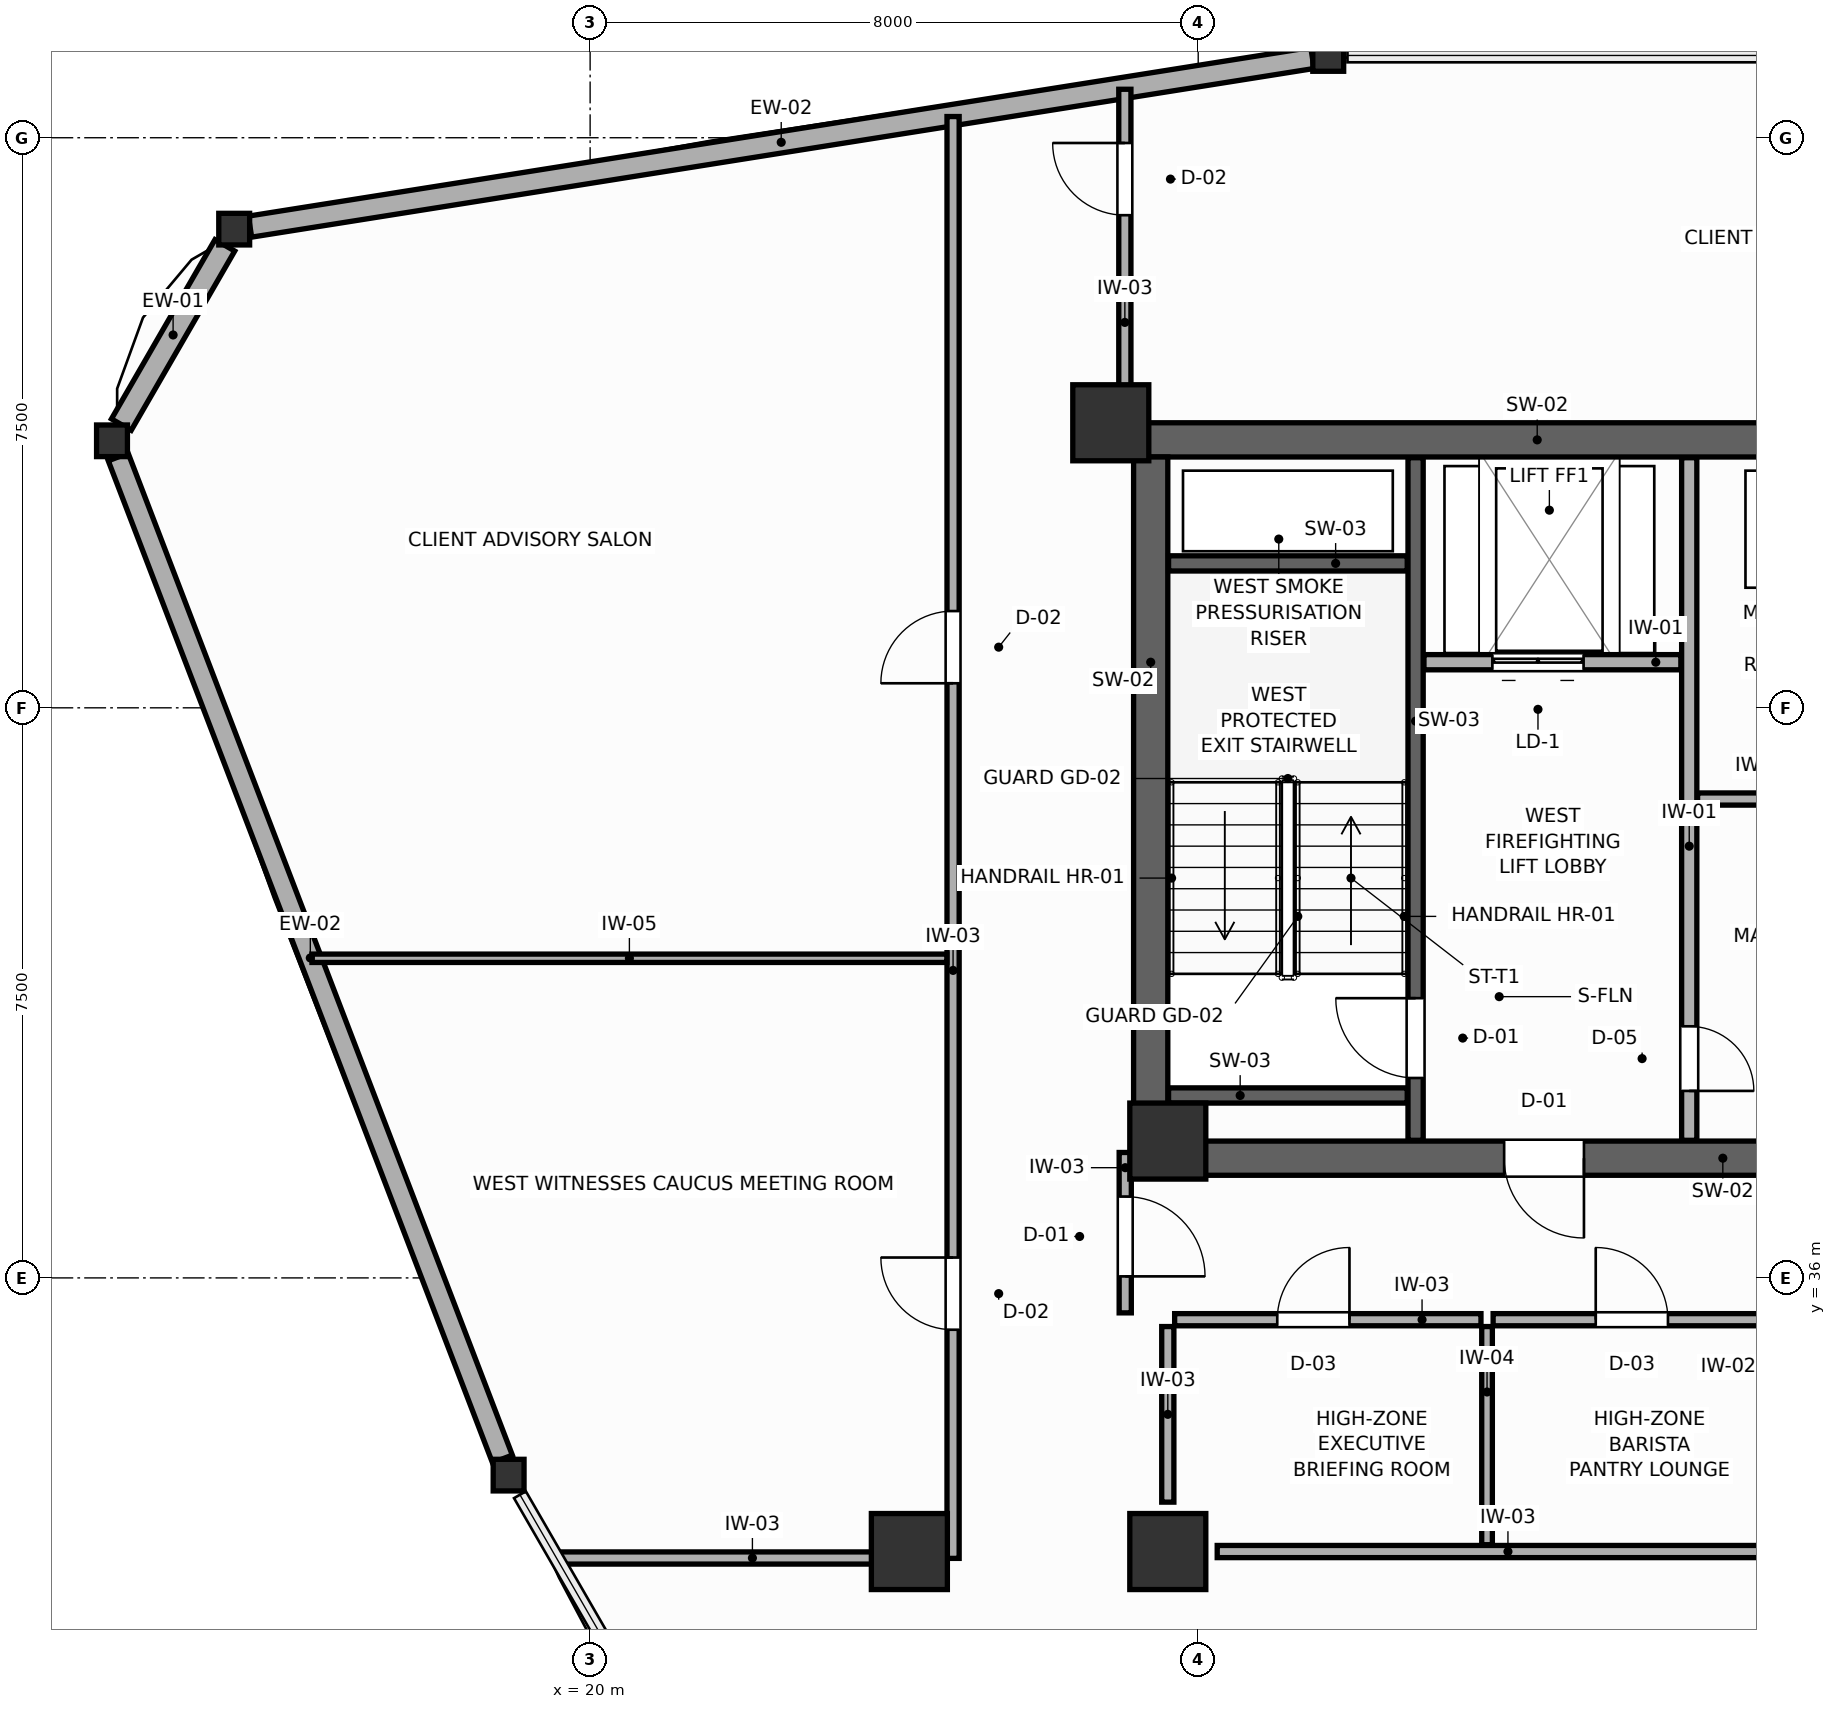
"""IFC4 building model, lengths in metres.
Left out: names, types, materials, properties, quantities, classifications, styles, units other than length and angle.
Written with IfcOpenShell. Run it as: python <this file> out.ifc"""

import sys

from ifc_helpers import new_model, si_unit, direction, frame, frame_2d, origin, origin_2d, place, context, subcontext, project, spatial, rectangle, i_section, extrude, source, transform, mapped, element, fill, save


model = new_model("IFC4")
c1 = context("Model", 3, precision=1e-05, world=origin(), true_north=direction((0.0, 1.0)))
c2 = subcontext(c1, "Body", "Model", "MODEL_VIEW")
j1 = project(units=[si_unit("LENGTHUNIT", "METRE"), si_unit("PLANEANGLEUNIT", "RADIAN")], contexts=[c1])
p1 = place(None, origin())
s1 = spatial("IfcSite", under=j1, at=p1, CompositionType="ELEMENT")
p2 = place(p1, origin())
s2 = spatial("IfcBuilding", under=s1, at=p2, CompositionType="ELEMENT")
p3 = place(p2, frame((0.0, 0.0, 186.6)))
s3 = spatial("IfcBuildingStorey", under=s2, at=p3, CompositionType="ELEMENT", Elevation=186.6)
p4 = place(p3, frame((27.15, 47.025, 0.0), z_axis=(0.0, 0.0, 1.0), x_axis=(1.0, 0.0, 0.0)))
e1 = element("IfcWall", 1, at=p4, inside=s3, PredefinedType="SHEAR", context=c2, shape_type="SweptSolid", body=[
    extrude(rectangle(XDim=17.7, YDim=0.45, at=frame_2d((8.85, 0.0))), origin(), (0.0, 0.0, 1.0), 3.6),
])
p5 = place(p3, frame((27.15, 37.575, 0.0), z_axis=(0.0, 0.0, 1.0), x_axis=(1.0, 0.0, 0.0)))
e2 = element("IfcWall", 2, at=p5, inside=s3, PredefinedType="SHEAR", context=c2, shape_type="SweptSolid", body=[
    extrude(rectangle(XDim=17.7, YDim=0.45, at=frame_2d((8.85, 0.0))), origin(), (0.0, 0.0, 1.0), 3.6),
])
p6 = place(p5, frame((4.875, 0.0, 0.0)))
e3 = element("IfcOpeningElement", 3, at=p6, cuts=e2, PredefinedType="OPENING", context=c2, shape_type="SweptSolid", body=[
    extrude(rectangle(XDim=1.05, YDim=2.1, at=frame_2d((0.525, 1.05))), frame((0.0, 0.235, 0.0), z_axis=(0.0, -1.0, 0.0), x_axis=(1.0, 0.0, 0.0)), (0.0, 0.0, 1.0), 0.47),
])
p7 = place(p5, frame((11.775, 0.0, 0.0)))
e4 = element("IfcOpeningElement", 4, at=p7, cuts=e2, PredefinedType="OPENING", context=c2, shape_type="SweptSolid", body=[
    extrude(rectangle(XDim=1.05, YDim=2.1, at=frame_2d((0.525, 1.05))), frame((0.0, 0.235, 0.0), z_axis=(0.0, -1.0, 0.0), x_axis=(1.0, 0.0, 0.0)), (0.0, 0.0, 1.0), 0.47),
])
p8 = place(p3, frame((27.375, 37.8, 0.0), z_axis=(0.0, 0.0, 1.0), x_axis=(0.0, 1.0, 0.0)))
e5 = element("IfcWall", 5, at=p8, inside=s3, PredefinedType="SHEAR", context=c2, shape_type="SweptSolid", body=[
    extrude(rectangle(XDim=9.0, YDim=0.45, at=frame_2d((4.5, 0.0))), origin(), (0.0, 0.0, 1.0), 3.6),
])
m1 = source(origin(), c2, "Body", "SweptSolid", [
    extrude(rectangle(XDim=1.0, YDim=1.0, at=origin_2d()), origin(), (0.0, 0.0, 1.0), 3.6),
])
for number, where, z_axis, x_axis in (
    (6, (26.85, 47.25, 0.0), (0.0, 0.0, 1.0), (1.0, 0.0, 0.0)),
    (7, (27.6, 37.8, 0.0), (0.0, 0.0, 1.0), (1.0, 0.0, 0.0)),
    (8, (27.6, 32.4, 0.0), (0.0, 0.0, 1.0), (1.0, 0.0, 0.0)),
    (9, (24.2, 32.4, 0.0), (0.0, 0.0, 1.0), (1.0, 0.0, 0.0)),
):
    element("IfcColumn", number, at=place(p3, frame(where, z_axis=z_axis, x_axis=x_axis)), inside=s3, PredefinedType="COLUMN", context=c2, shape_type="MappedRepresentation", body=[
        mapped(m1, transform((0.0, 0.0, 0.0), scale=1.0)),
    ])
m2 = source(origin(), c2, "Body", "SweptSolid", [
    extrude(i_section(OverallWidth=0.406, OverallDepth=0.416, WebThickness=0.027, FlangeThickness=0.044, FilletRadius=0.015, at=origin_2d()), origin(), (0.0, 0.0, 1.0), 3.6),
])
for number, where, z_axis, x_axis in (
    (10, (29.711, 52.082, 0.0), (0.0, 0.0, 1.0), (1.0, 0.0, 0.0)),
    (11, (15.317, 49.798, 0.0), (0.0, 0.0, 1.0), (1.0, 0.0, 0.0)),
    (12, (13.71, 47.013, 0.0), (0.0, 0.0, 1.0), (1.0, 0.0, 0.0)),
    (13, (18.927, 33.406, 0.0), (0.0, 0.0, 1.0), (1.0, 0.0, 0.0)),
):
    element("IfcColumn", number, at=place(p3, frame(where, z_axis=z_axis, x_axis=x_axis)), inside=s3, PredefinedType="COLUMN", context=c2, shape_type="MappedRepresentation", body=[
        mapped(m2, transform((0.0, 0.0, 0.0), scale=1.0)),
    ])
p9 = place(p3, frame((29.503, 52.049, 0.0), z_axis=(0.0, 0.0, 1.0), x_axis=(-0.987634086957, -0.156776625426, 0.0)))
e14 = element("IfcWall", 14, at=p9, inside=s3, PredefinedType="SOLIDWALL", context=c2, shape_type="SweptSolid", body=[
    extrude(rectangle(XDim=14.152, YDim=0.28, at=frame_2d((7.076, 0.0))), origin(), (0.0, 0.0, 1.0), 1.87),
])
p10 = place(p3, frame((15.194, 49.584, 0.0), z_axis=(0.0, 0.0, 1.0), x_axis=(-0.499947493121, -0.866055716523, 0.0)))
e15 = element("IfcWall", 15, at=p10, inside=s3, PredefinedType="SOLIDWALL", context=c2, shape_type="SweptSolid", body=[
    extrude(rectangle(XDim=2.723, YDim=0.3, at=frame_2d((1.362, 0.0))), origin(), (0.0, 0.0, 1.0), 1.87),
])
p11 = place(p3, frame((13.792, 46.8, 0.0), z_axis=(0.0, 0.0, 1.0), x_axis=(0.358033263681, -0.933708831541, 0.0)))
e16 = element("IfcWall", 16, at=p11, inside=s3, PredefinedType="SOLIDWALL", context=c2, shape_type="SweptSolid", body=[
    extrude(rectangle(XDim=14.117, YDim=0.28, at=frame_2d((7.059, 0.0))), origin(), (0.0, 0.0, 1.0), 1.87),
])
p12 = place(p3, frame((30.86, 37.81, 0.0), z_axis=(0.0, 0.0, 1.0), x_axis=(0.0, 1.0, 0.0)))
e17 = element("IfcWall", 17, at=p12, inside=s3, PredefinedType="SHEAR", context=c2, shape_type="SweptSolid", body=[
    extrude(rectangle(XDim=8.98, YDim=0.2, at=frame_2d((4.49, 0.0))), origin(), (0.0, 0.0, 1.0), 3.6),
])
p13 = place(p12, frame((0.82, 0.0, 0.0)))
e18 = element("IfcOpeningElement", 18, at=p13, cuts=e17, PredefinedType="OPENING", context=c2, shape_type="SweptSolid", body=[
    extrude(rectangle(XDim=1.05, YDim=2.1, at=frame_2d((0.525, 1.05))), frame((0.0, 0.11, 0.0), z_axis=(0.0, -1.0, 0.0), x_axis=(1.0, 0.0, 0.0)), (0.0, 0.0, 1.0), 0.22),
])
for number, where, z_axis, x_axis in (
    (19, (27.61, 45.4, 0.0), (0.0, 0.0, 1.0), (1.0, 0.0, 0.0)),
    (20, (27.61, 38.4, 0.0), (0.0, 0.0, 1.0), (1.0, 0.0, 0.0)),
):
    element("IfcWall", number, at=place(p3, frame(where, z_axis=z_axis, x_axis=x_axis)), inside=s3, PredefinedType="SHEAR", context=c2, shape_type="SweptSolid", body=[
        extrude(rectangle(XDim=3.14, YDim=0.2, at=frame_2d((1.57, 0.0))), origin(), (0.0, 0.0, 1.0), 3.6),
    ])
p14 = place(p3, frame((30.97, 44.1, 0.0), z_axis=(0.0, 0.0, 1.0), x_axis=(1.0, 0.0, 0.0)))
e21 = element("IfcWall", 21, at=p14, inside=s3, PredefinedType="PARTITIONING", context=c2, shape_type="SweptSolid", body=[
    extrude(rectangle(XDim=3.38, YDim=0.2, at=frame_2d((1.69, 0.0))), origin(), (0.0, 0.0, 1.0), 3.4),
])
p15 = place(p14, frame((0.9, 0.0, 0.0)))
e22 = element("IfcOpeningElement", 22, at=p15, cuts=e21, PredefinedType="OPENING", context=c2, shape_type="SweptSolid", body=[
    extrude(rectangle(XDim=1.2, YDim=2.1, at=frame_2d((0.6, 1.05))), frame((0.0, 0.11, 0.0), z_axis=(0.0, -1.0, 0.0), x_axis=(1.0, 0.0, 0.0)), (0.0, 0.0, 1.0), 0.22),
])
p16 = place(p3, frame((34.46, 37.81, 0.0), z_axis=(0.0, 0.0, 1.0), x_axis=(0.0, 1.0, 0.0)))
e23 = element("IfcWall", 23, at=p16, inside=s3, PredefinedType="PARTITIONING", context=c2, shape_type="SweptSolid", body=[
    extrude(rectangle(XDim=8.98, YDim=0.2, at=frame_2d((4.49, 0.0))), origin(), (0.0, 0.0, 1.0), 3.4),
])
p17 = place(p16, frame((0.65, 0.0, 0.0)))
e24 = element("IfcOpeningElement", 24, at=p17, cuts=e23, PredefinedType="OPENING", context=c2, shape_type="SweptSolid", body=[
    extrude(rectangle(XDim=0.85, YDim=2.05, at=frame_2d((0.425, 1.025))), frame((0.0, 0.11, 0.0), z_axis=(0.0, -1.0, 0.0), x_axis=(1.0, 0.0, 0.0)), (0.0, 0.0, 1.0), 0.22),
])
p18 = place(p3, frame((34.57, 42.3, 0.0), z_axis=(0.0, 0.0, 1.0), x_axis=(1.0, 0.0, 0.0)))
e25 = element("IfcWall", 25, at=p18, inside=s3, PredefinedType="PARTITIONING", context=c2, shape_type="SweptSolid", body=[
    extrude(rectangle(XDim=2.86, YDim=0.16, at=frame_2d((1.43, 0.0))), origin(), (0.0, 0.0, 1.0), 3.4),
])
p19 = place(p3, frame((28.25, 32.4, 0.0), z_axis=(0.0, 0.0, 1.0), x_axis=(1.0, 0.0, 0.0)))
e26 = element("IfcWall", 26, at=p19, inside=s3, PredefinedType="PARTITIONING", context=c2, shape_type="SweptSolid", body=[
    extrude(rectangle(XDim=7.65, YDim=0.16, at=frame_2d((3.825, 0.0))), origin(), (0.0, 0.0, 1.0), 2.16),
])
p20 = place(p3, frame((27.6, 33.05, 0.0), z_axis=(0.0, 0.0, 1.0), x_axis=(0.0, 1.0, 0.0)))
e27 = element("IfcWall", 27, at=p20, inside=s3, PredefinedType="PARTITIONING", context=c2, shape_type="SweptSolid", body=[
    extrude(rectangle(XDim=2.31, YDim=0.16, at=frame_2d((1.155, 0.0))), origin(), (0.0, 0.0, 1.0), 3.4),
])
p21 = place(p3, frame((31.8, 32.49, 0.0), z_axis=(0.0, 0.0, 1.0), x_axis=(0.0, 1.0, 0.0)))
e28 = element("IfcWall", 28, at=p21, inside=s3, PredefinedType="PARTITIONING", context=c2, shape_type="SweptSolid", body=[
    extrude(rectangle(XDim=2.87, YDim=0.14, at=frame_2d((1.435, 0.0))), origin(), (0.0, 0.0, 1.0), 3.4),
])
p22 = place(p3, frame((27.69, 35.45, 0.0), z_axis=(0.0, 0.0, 1.0), x_axis=(1.0, 0.0, 0.0)))
e29 = element("IfcWall", 29, at=p22, inside=s3, PredefinedType="PARTITIONING", context=c2, shape_type="SweptSolid", body=[
    extrude(rectangle(XDim=4.03, YDim=0.16, at=frame_2d((2.015, 0.0))), origin(), (0.0, 0.0, 1.0), 3.4),
])
p23 = place(p22, frame((1.35, 0.0, 0.0)))
e30 = element("IfcOpeningElement", 30, at=p23, cuts=e29, PredefinedType="OPENING", context=c2, shape_type="SweptSolid", body=[
    extrude(rectangle(XDim=0.95, YDim=2.05, at=frame_2d((0.475, 1.025))), frame((0.0, 0.09, 0.0), z_axis=(0.0, -1.0, 0.0), x_axis=(1.0, 0.0, 0.0)), (0.0, 0.0, 1.0), 0.18),
])
p24 = place(p3, frame((31.88, 35.45, 0.0), z_axis=(0.0, 0.0, 1.0), x_axis=(1.0, 0.0, 0.0)))
e31 = element("IfcWall", 31, at=p24, inside=s3, PredefinedType="PARTITIONING", context=c2, shape_type="SweptSolid", body=[
    extrude(rectangle(XDim=4.02, YDim=0.16, at=frame_2d((2.01, 0.0))), origin(), (0.0, 0.0, 1.0), 3.4),
])
p25 = place(p24, frame((1.35, 0.0, 0.0)))
e32 = element("IfcOpeningElement", 32, at=p25, cuts=e31, PredefinedType="OPENING", context=c2, shape_type="SweptSolid", body=[
    extrude(rectangle(XDim=0.95, YDim=2.05, at=frame_2d((0.475, 1.025))), frame((0.0, 0.09, 0.0), z_axis=(0.0, -1.0, 0.0), x_axis=(1.0, 0.0, 0.0)), (0.0, 0.0, 1.0), 0.18),
])
p26 = place(p3, frame((27.04, 35.54, 0.0), z_axis=(0.0, 0.0, 1.0), x_axis=(0.0, 1.0, 0.0)))
e33 = element("IfcWall", 33, at=p26, inside=s3, PredefinedType="PARTITIONING", context=c2, shape_type="SweptSolid", body=[
    extrude(rectangle(XDim=2.11, YDim=0.16, at=frame_2d((1.055, 0.0))), origin(), (0.0, 0.0, 1.0), 3.4),
])
p27 = place(p26, frame((0.48, 0.0, 0.0)))
e34 = element("IfcOpeningElement", 34, at=p27, cuts=e33, PredefinedType="OPENING", context=c2, shape_type="SweptSolid", body=[
    extrude(rectangle(XDim=1.05, YDim=2.1, at=frame_2d((0.525, 1.05))), frame((0.0, 0.09, 0.0), z_axis=(0.0, -1.0, 0.0), x_axis=(1.0, 0.0, 0.0)), (0.0, 0.0, 1.0), 0.18),
])
p28 = place(p3, frame((24.775, 32.31, 0.0), z_axis=(0.0, 0.0, 1.0), x_axis=(0.0, 1.0, 0.0)))
e35 = element("IfcWall", 35, at=p28, inside=s3, PredefinedType="PARTITIONING", context=c2, shape_type="SweptSolid", body=[
    extrude(rectangle(XDim=18.969, YDim=0.16, at=frame_2d((9.484, 0.0))), origin(), (0.0, 0.0, 1.0), 3.4),
])
p29 = place(p28, frame((3.008, 0.0, 0.0)))
e36 = element("IfcOpeningElement", 36, at=p29, cuts=e35, PredefinedType="OPENING", context=c2, shape_type="SweptSolid", body=[
    extrude(rectangle(XDim=0.95, YDim=2.05, at=frame_2d((0.475, 1.025))), frame((0.0, 0.09, 0.0), z_axis=(0.0, -1.0, 0.0), x_axis=(1.0, 0.0, 0.0)), (0.0, 0.0, 1.0), 0.18),
])
p30 = place(p28, frame((11.513, 0.0, 0.0)))
e37 = element("IfcOpeningElement", 37, at=p30, cuts=e35, PredefinedType="OPENING", context=c2, shape_type="SweptSolid", body=[
    extrude(rectangle(XDim=0.95, YDim=2.05, at=frame_2d((0.475, 1.025))), frame((0.0, 0.09, 0.0), z_axis=(0.0, -1.0, 0.0), x_axis=(1.0, 0.0, 0.0)), (0.0, 0.0, 1.0), 0.18),
])
p31 = place(p3, frame((19.577, 32.315, 0.0), z_axis=(0.0, 0.0, 1.0), x_axis=(1.0, 0.0, 0.0)))
e38 = element("IfcWall", 38, at=p31, inside=s3, PredefinedType="PARTITIONING", context=c2, shape_type="SweptSolid", body=[
    extrude(rectangle(XDim=5.116, YDim=0.16, at=frame_2d((2.558, 0.0))), origin(), (0.0, 0.0, 1.0), 2.16),
])
p32 = place(p3, frame((27.035, 47.34, 0.0), z_axis=(0.0, 0.0, 1.0), x_axis=(0.0, 1.0, 0.0)))
e39 = element("IfcWall", 39, at=p32, inside=s3, PredefinedType="PARTITIONING", context=c2, shape_type="SweptSolid", body=[
    extrude(rectangle(XDim=4.298, YDim=0.16, at=frame_2d((2.149, 0.0))), origin(), (0.0, 0.0, 1.0), 3.4),
])
p33 = place(p32, frame((2.641, 0.0, 0.0)))
e40 = element("IfcOpeningElement", 40, at=p33, cuts=e39, PredefinedType="OPENING", context=c2, shape_type="SweptSolid", body=[
    extrude(rectangle(XDim=0.95, YDim=2.05, at=frame_2d((0.475, 1.025))), frame((0.0, 0.09, 0.0), z_axis=(0.0, -1.0, 0.0), x_axis=(1.0, 0.0, 0.0)), (0.0, 0.0, 1.0), 0.18),
])
p34 = place(p3, frame((16.34, 40.205, 0.0), z_axis=(0.0, 0.0, 1.0), x_axis=(1.0, 0.0, 0.0)))
e41 = element("IfcWall", 41, at=p34, inside=s3, PredefinedType="MOVABLE", context=c2, shape_type="SweptSolid", body=[
    extrude(rectangle(XDim=8.353, YDim=0.11, at=frame_2d((4.176, 0.0))), origin(), (0.0, 0.0, 1.0), 3.4),
])
p35 = place(p13, origin())
e42 = element("IfcDoor", 42, at=p35, inside=s3, OperationType="SINGLE_SWING_RIGHT", PredefinedType="DOOR", context=c2, shape_type="SweptSolid", body=[
    extrude(rectangle(XDim=1.05, YDim=2.1, at=frame_2d((0.525, 1.05))), frame((0.0, 0.025, 0.0), z_axis=(0.0, -1.0, 0.0), x_axis=(1.0, 0.0, 0.0)), (0.0, 0.0, 1.0), 0.05),
])
fill(e18, e42)
p36 = place(p15, origin())
e43 = element("IfcDoor", 43, at=p36, inside=s3, OperationType="DOUBLE_DOOR_SLIDING", PredefinedType="DOOR", context=c2, shape_type="SweptSolid", body=[
    extrude(rectangle(XDim=1.2, YDim=2.1, at=frame_2d((0.6, 1.05))), frame((0.0, 0.025, 0.0), z_axis=(0.0, -1.0, 0.0), x_axis=(1.0, 0.0, 0.0)), (0.0, 0.0, 1.0), 0.05),
])
fill(e22, e43)
p37 = place(p17, frame((0.85, 0.0, 0.0), z_axis=(0.0, 0.0, 1.0), x_axis=(-1.0, 0.0, 0.0)))
e44 = element("IfcDoor", 44, at=p37, inside=s3, OperationType="SINGLE_SWING_RIGHT", PredefinedType="DOOR", context=c2, shape_type="SweptSolid", body=[
    extrude(rectangle(XDim=0.85, YDim=2.05, at=frame_2d((0.425, 1.025))), frame((0.0, 0.025, 0.0), z_axis=(0.0, -1.0, 0.0), x_axis=(1.0, 0.0, 0.0)), (0.0, 0.0, 1.0), 0.05),
])
fill(e24, e44)
p38 = place(p23, origin())
e45 = element("IfcDoor", 45, at=p38, inside=s3, OperationType="SINGLE_SWING_RIGHT", PredefinedType="DOOR", context=c2, shape_type="SweptSolid", body=[
    extrude(rectangle(XDim=0.95, YDim=2.05, at=frame_2d((0.475, 1.025))), frame((0.0, 0.025, 0.0), z_axis=(0.0, -1.0, 0.0), x_axis=(1.0, 0.0, 0.0)), (0.0, 0.0, 1.0), 0.05),
])
fill(e30, e45)
p39 = place(p25, origin())
e46 = element("IfcDoor", 46, at=p39, inside=s3, OperationType="SINGLE_SWING_LEFT", PredefinedType="DOOR", context=c2, shape_type="SweptSolid", body=[
    extrude(rectangle(XDim=0.95, YDim=2.05, at=frame_2d((0.475, 1.025))), frame((0.0, 0.025, 0.0), z_axis=(0.0, -1.0, 0.0), x_axis=(1.0, 0.0, 0.0)), (0.0, 0.0, 1.0), 0.05),
])
fill(e32, e46)
p40 = place(p27, frame((1.05, 0.0, 0.0), z_axis=(0.0, 0.0, 1.0), x_axis=(-1.0, 0.0, 0.0)))
e47 = element("IfcDoor", 47, at=p40, inside=s3, OperationType="SINGLE_SWING_RIGHT", PredefinedType="DOOR", context=c2, shape_type="SweptSolid", body=[
    extrude(rectangle(XDim=1.05, YDim=2.1, at=frame_2d((0.525, 1.05))), frame((0.0, 0.025, 0.0), z_axis=(0.0, -1.0, 0.0), x_axis=(1.0, 0.0, 0.0)), (0.0, 0.0, 1.0), 0.05),
])
fill(e34, e47)
p41 = place(p29, origin())
e48 = element("IfcDoor", 48, at=p41, inside=s3, OperationType="SINGLE_SWING_RIGHT", PredefinedType="DOOR", context=c2, shape_type="SweptSolid", body=[
    extrude(rectangle(XDim=0.95, YDim=2.05, at=frame_2d((0.475, 1.025))), frame((0.0, 0.025, 0.0), z_axis=(0.0, -1.0, 0.0), x_axis=(1.0, 0.0, 0.0)), (0.0, 0.0, 1.0), 0.05),
])
fill(e36, e48)
p42 = place(p30, origin())
e49 = element("IfcDoor", 49, at=p42, inside=s3, OperationType="SINGLE_SWING_LEFT", PredefinedType="DOOR", context=c2, shape_type="SweptSolid", body=[
    extrude(rectangle(XDim=0.95, YDim=2.05, at=frame_2d((0.475, 1.025))), frame((0.0, 0.025, 0.0), z_axis=(0.0, -1.0, 0.0), x_axis=(1.0, 0.0, 0.0)), (0.0, 0.0, 1.0), 0.05),
])
fill(e37, e49)
p43 = place(p33, origin())
e50 = element("IfcDoor", 50, at=p43, inside=s3, OperationType="SINGLE_SWING_RIGHT", PredefinedType="DOOR", context=c2, shape_type="SweptSolid", body=[
    extrude(rectangle(XDim=0.95, YDim=2.05, at=frame_2d((0.475, 1.025))), frame((0.0, 0.025, 0.0), z_axis=(0.0, -1.0, 0.0), x_axis=(1.0, 0.0, 0.0)), (0.0, 0.0, 1.0), 0.05),
])
fill(e40, e50)
p44 = place(p6, frame((1.05, 0.0, 0.0), z_axis=(0.0, 0.0, 1.0), x_axis=(-1.0, 0.0, 0.0)))
e51 = element("IfcDoor", 51, at=p44, inside=s3, OperationType="SINGLE_SWING_LEFT", PredefinedType="DOOR", context=c2, shape_type="SweptSolid", body=[
    extrude(rectangle(XDim=1.05, YDim=2.1, at=frame_2d((0.525, 1.05))), frame((0.0, 0.025, 0.0), z_axis=(0.0, -1.0, 0.0), x_axis=(1.0, 0.0, 0.0)), (0.0, 0.0, 1.0), 0.05),
])
fill(e3, e51)
save(model, sys.argv[1])
